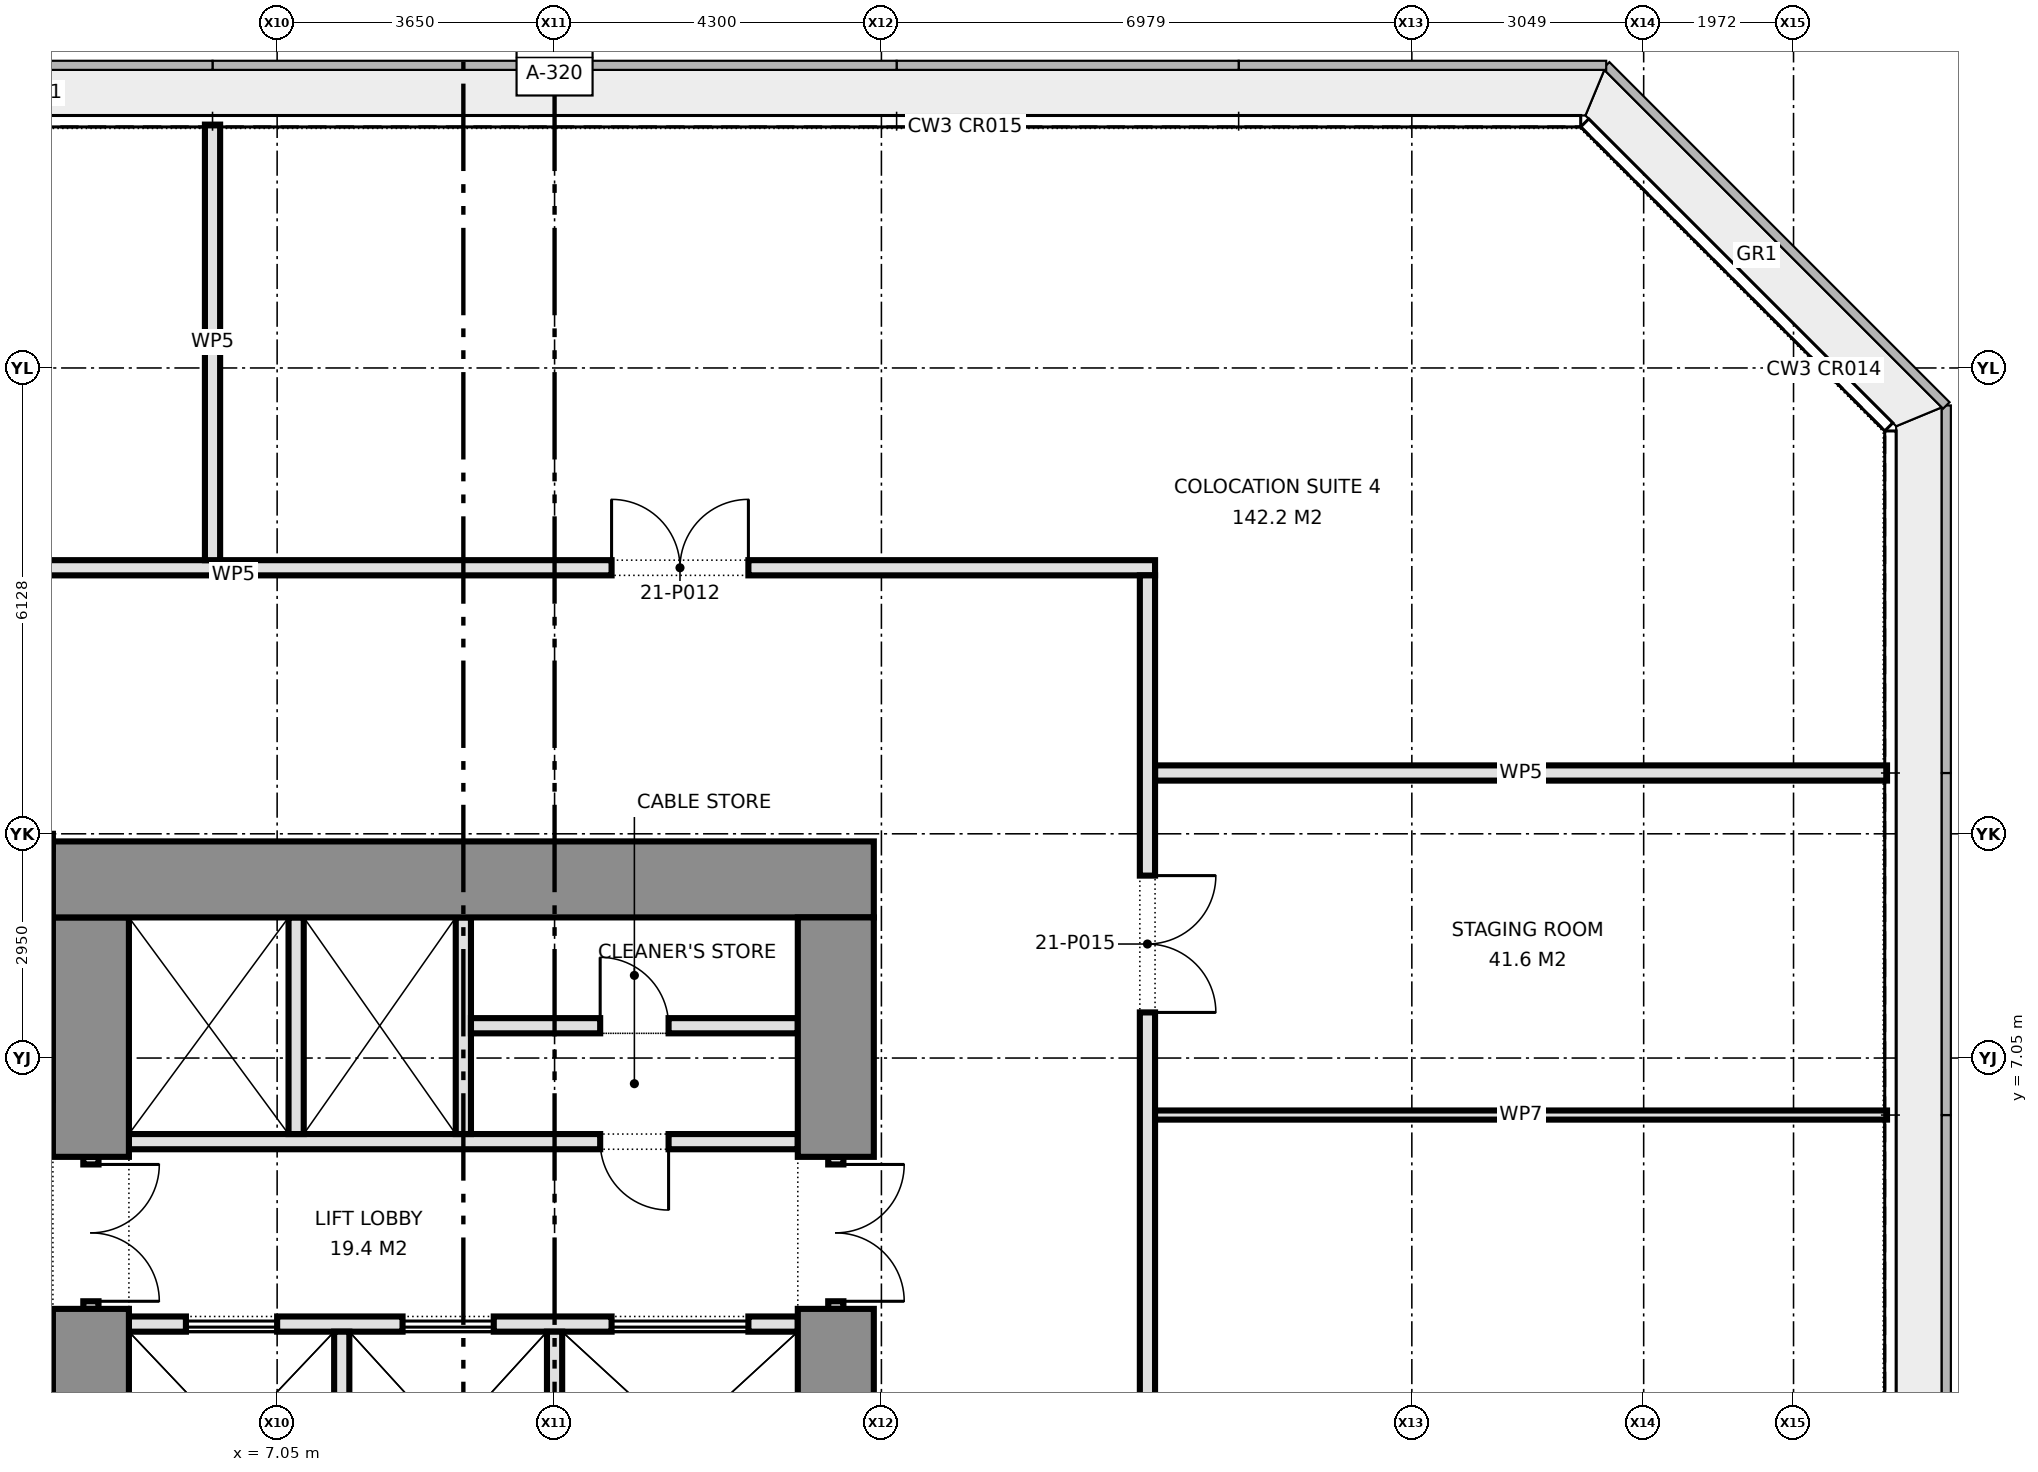
"""IFC4 building model, lengths in metres.
Left out: names, types, materials, properties, quantities, classifications, styles, units other than length and angle.
Written with IfcOpenShell. Run it as: python <this file> out.ifc"""

import sys

from ifc_helpers import new_model, si_unit, direction, frame, frame_2d, origin, place, context, subcontext, project, spatial, rectangle, extrude, element, fill, save


model = new_model("IFC4")
c1 = context("Model", 3, precision=1e-05, world=origin(), true_north=direction((0.0, 1.0)))
c2 = subcontext(c1, "Body", "Model", "MODEL_VIEW")
j1 = project(units=[si_unit("LENGTHUNIT", "METRE"), si_unit("PLANEANGLEUNIT", "RADIAN")], contexts=[c1])
p1 = place(None, origin())
s1 = spatial("IfcSite", under=j1, at=p1, CompositionType="ELEMENT")
p2 = place(p1, origin())
s2 = spatial("IfcBuilding", under=s1, at=p2, CompositionType="ELEMENT")
p3 = place(p2, frame((0.0, 0.0, 95.2)))
s3 = spatial("IfcBuildingStorey", under=s2, at=p3, CompositionType="ELEMENT", Elevation=95.2)
p4 = place(p3, frame((14.9, 9.4, 0.0), z_axis=(0.0, 0.0, 1.0), x_axis=(-1.0, 0.0, 0.0)))
e1 = element("IfcWall", 1, at=p4, inside=s3, PredefinedType="SHEAR", context=c2, shape_type="SweptSolid", body=[
    extrude(rectangle(XDim=10.8, YDim=1.0, at=frame_2d((5.4, 0.0))), origin(), (0.0, 0.0, 1.0), 4.2),
])
p5 = place(p3, frame((14.4, 8.9, 0.0), z_axis=(0.0, 0.0, 1.0), x_axis=(0.0, -1.0, 0.0)))
e2 = element("IfcWall", 2, at=p5, inside=s3, PredefinedType="SHEAR", context=c2, shape_type="SweptSolid", body=[
    extrude(rectangle(XDim=3.15, YDim=1.0, at=frame_2d((1.575, 0.0))), origin(), (0.0, 0.0, 1.0), 4.2),
])
p6 = place(p3, frame((14.4, 5.75, 0.0), z_axis=(0.0, 0.0, 1.0), x_axis=(0.0, -1.0, 0.0)))
e3 = element("IfcWall", 3, at=p6, inside=s3, PredefinedType="PARTITIONING", context=c2, shape_type="SweptSolid", body=[
    extrude(rectangle(XDim=2.0, YDim=0.2, at=frame_2d((1.0, 0.0))), origin(), (0.0, 0.0, 1.0), 2.4),
])
p7 = place(p6, frame((0.1, 0.0, 0.0)))
e4 = element("IfcOpeningElement", 4, at=p7, cuts=e3, PredefinedType="OPENING", context=c2, shape_type="SweptSolid", body=[
    extrude(rectangle(XDim=1.8, YDim=2.1, at=frame_2d((0.9, 1.05))), frame((0.0, 0.11, 0.0), z_axis=(0.0, -1.0, 0.0), x_axis=(1.0, 0.0, 0.0)), (0.0, 0.0, 1.0), 0.22),
])
p8 = place(p3, frame((14.4, 3.75, 0.0), z_axis=(0.0, 0.0, 1.0), x_axis=(0.0, -1.0, 0.0)))
e5 = element("IfcWall", 5, at=p8, inside=s3, PredefinedType="SHEAR", context=c2, shape_type="SweptSolid", body=[
    extrude(rectangle(XDim=6.13, YDim=1.0, at=frame_2d((3.065, 0.0))), origin(), (0.0, 0.0, 1.0), 4.2),
])
p9 = place(p3, frame((4.6, 8.9, 0.0), z_axis=(0.0, 0.0, 1.0), x_axis=(0.0, -1.0, 0.0)))
e6 = element("IfcWall", 6, at=p9, inside=s3, PredefinedType="SHEAR", context=c2, shape_type="SweptSolid", body=[
    extrude(rectangle(XDim=3.15, YDim=1.0, at=frame_2d((1.575, 0.0))), origin(), (0.0, 0.0, 1.0), 4.2),
])
p10 = place(p3, frame((4.6, 5.75, 0.0), z_axis=(0.0, 0.0, 1.0), x_axis=(0.0, -1.0, 0.0)))
e7 = element("IfcWall", 7, at=p10, inside=s3, PredefinedType="PARTITIONING", context=c2, shape_type="SweptSolid", body=[
    extrude(rectangle(XDim=2.0, YDim=0.2, at=frame_2d((1.0, 0.0))), origin(), (0.0, 0.0, 1.0), 2.4),
])
p11 = place(p10, frame((0.1, 0.0, 0.0)))
e8 = element("IfcOpeningElement", 8, at=p11, cuts=e7, PredefinedType="OPENING", context=c2, shape_type="SweptSolid", body=[
    extrude(rectangle(XDim=1.8, YDim=2.1, at=frame_2d((0.9, 1.05))), frame((0.0, 0.11, 0.0), z_axis=(0.0, -1.0, 0.0), x_axis=(1.0, 0.0, 0.0)), (0.0, 0.0, 1.0), 0.22),
])
p12 = place(p3, frame((4.6, 3.75, 0.0), z_axis=(0.0, 0.0, 1.0), x_axis=(0.0, -1.0, 0.0)))
e9 = element("IfcWall", 9, at=p12, inside=s3, PredefinedType="SHEAR", context=c2, shape_type="SweptSolid", body=[
    extrude(rectangle(XDim=4.0, YDim=1.0, at=frame_2d((2.0, 0.0))), origin(), (0.0, 0.0, 1.0), 4.2),
])
p13 = place(p3, frame((13.9, 5.95, 0.0), z_axis=(0.0, 0.0, 1.0), x_axis=(-1.0, 0.0, 0.0)))
e10 = element("IfcWall", 10, at=p13, inside=s3, PredefinedType="PARTITIONING", context=c2, shape_type="SweptSolid", body=[
    extrude(rectangle(XDim=8.8, YDim=0.2, at=frame_2d((4.4, 0.0))), origin(), (0.0, 0.0, 1.0), 4.2),
])
p14 = place(p13, frame((1.7, 0.0, 0.0)))
e11 = element("IfcOpeningElement", 11, at=p14, cuts=e10, PredefinedType="OPENING", context=c2, shape_type="SweptSolid", body=[
    extrude(rectangle(XDim=0.9, YDim=2.1, at=frame_2d((0.45, 1.05))), frame((0.0, 0.11, 0.0), z_axis=(0.0, -1.0, 0.0), x_axis=(1.0, 0.0, 0.0)), (0.0, 0.0, 1.0), 0.22),
])
p15 = place(p3, frame((13.9, 3.55, 0.0), z_axis=(0.0, 0.0, 1.0), x_axis=(-1.0, 0.0, 0.0)))
e12 = element("IfcWall", 12, at=p15, inside=s3, PredefinedType="PARTITIONING", context=c2, shape_type="SweptSolid", body=[
    extrude(rectangle(XDim=8.8, YDim=0.2, at=frame_2d((4.4, 0.0))), origin(), (0.0, 0.0, 1.0), 4.2),
])
p16 = place(p15, frame((0.65, 0.0, 0.0)))
e13 = element("IfcOpeningElement", 13, at=p16, cuts=e12, PredefinedType="OPENING", context=c2, shape_type="SweptSolid", body=[
    extrude(rectangle(XDim=1.8, YDim=2.1, at=frame_2d((0.9, 1.05))), frame((0.0, 0.11, 0.0), z_axis=(0.0, -1.0, 0.0), x_axis=(1.0, 0.0, 0.0)), (0.0, 0.0, 1.0), 0.22),
])
p17 = place(p15, frame((4.0, 0.0, 0.0)))
e14 = element("IfcOpeningElement", 14, at=p17, cuts=e12, PredefinedType="OPENING", context=c2, shape_type="SweptSolid", body=[
    extrude(rectangle(XDim=1.2, YDim=2.1, at=frame_2d((0.6, 1.05))), frame((0.0, 0.11, 0.0), z_axis=(0.0, -1.0, 0.0), x_axis=(1.0, 0.0, 0.0)), (0.0, 0.0, 1.0), 0.22),
])
p18 = place(p15, frame((6.85, 0.0, 0.0)))
e15 = element("IfcOpeningElement", 15, at=p18, cuts=e12, PredefinedType="OPENING", context=c2, shape_type="SweptSolid", body=[
    extrude(rectangle(XDim=1.2, YDim=2.1, at=frame_2d((0.6, 1.05))), frame((0.0, 0.11, 0.0), z_axis=(0.0, -1.0, 0.0), x_axis=(1.0, 0.0, 0.0)), (0.0, 0.0, 1.0), 0.22),
])
for number, where, z_axis, x_axis in (
    (16, (9.5, 8.9, 0.0), (0.0, 0.0, 1.0), (0.0, -1.0, 0.0)),
    (17, (7.3, 8.9, 0.0), (0.0, 0.0, 1.0), (0.0, -1.0, 0.0)),
):
    element("IfcWall", number, at=place(p3, frame(where, z_axis=z_axis, x_axis=x_axis)), inside=s3, PredefinedType="PARTITIONING", context=c2, shape_type="SweptSolid", body=[
        extrude(rectangle(XDim=2.85, YDim=0.2, at=frame_2d((1.425, 0.0))), origin(), (0.0, 0.0, 1.0), 4.2),
    ])
p19 = place(p3, frame((13.9, 7.475, 0.0), z_axis=(0.0, 0.0, 1.0), x_axis=(-1.0, 0.0, 0.0)))
e18 = element("IfcWall", 18, at=p19, inside=s3, PredefinedType="PARTITIONING", context=c2, shape_type="SweptSolid", body=[
    extrude(rectangle(XDim=4.3, YDim=0.2, at=frame_2d((2.15, 0.0))), origin(), (0.0, 0.0, 1.0), 4.2),
])
p20 = place(p19, frame((1.7, 0.0, 0.0)))
e19 = element("IfcOpeningElement", 19, at=p20, cuts=e18, PredefinedType="OPENING", context=c2, shape_type="SweptSolid", body=[
    extrude(rectangle(XDim=0.9, YDim=2.1, at=frame_2d((0.45, 1.05))), frame((0.0, 0.11, 0.0), z_axis=(0.0, -1.0, 0.0), x_axis=(1.0, 0.0, 0.0)), (0.0, 0.0, 1.0), 0.22),
])
for number, where, z_axis, x_axis in (
    (20, (10.7, 3.45, 0.0), (0.0, 0.0, 1.0), (0.0, -1.0, 0.0)),
    (21, (7.9, 3.45, 0.0), (0.0, 0.0, 1.0), (0.0, -1.0, 0.0)),
):
    element("IfcWall", number, at=place(p3, frame(where, z_axis=z_axis, x_axis=x_axis)), inside=s3, PredefinedType="PARTITIONING", context=c2, shape_type="SweptSolid", body=[
        extrude(rectangle(XDim=2.85, YDim=0.2, at=frame_2d((1.425, 0.0))), origin(), (0.0, 0.0, 1.0), 4.2),
    ])
p21 = place(p3, frame((18.6, 10.8, 0.0), z_axis=(0.0, 0.0, 1.0), x_axis=(1.0, 0.0, 0.0)))
e22 = element("IfcWall", 22, at=p21, inside=s3, PredefinedType="PARTITIONING", context=c2, shape_type="SweptSolid", body=[
    extrude(rectangle(XDim=9.63, YDim=0.2, at=frame_2d((4.815, 0.0))), origin(), (0.0, 0.0, 1.0), 4.2),
])
p22 = place(p3, frame((-18.6, 13.5, 0.0), z_axis=(0.0, 0.0, 1.0), x_axis=(1.0, 0.0, 0.0)))
e23 = element("IfcWall", 23, at=p22, inside=s3, PredefinedType="PARTITIONING", context=c2, shape_type="SweptSolid", body=[
    extrude(rectangle(XDim=37.2, YDim=0.2, at=frame_2d((18.6, 0.0))), origin(), (0.0, 0.0, 1.0), 4.2),
])
p23 = place(p22, frame((5.1, 0.0, 0.0)))
e24 = element("IfcOpeningElement", 24, at=p23, cuts=e23, PredefinedType="OPENING", context=c2, shape_type="SweptSolid", body=[
    extrude(rectangle(XDim=1.2, YDim=2.1, at=frame_2d((0.6, 1.05))), frame((0.0, 0.11, 0.0), z_axis=(0.0, -1.0, 0.0), x_axis=(1.0, 0.0, 0.0)), (0.0, 0.0, 1.0), 0.22),
])
p24 = place(p22, frame((18.9, 0.0, 0.0)))
e25 = element("IfcOpeningElement", 25, at=p24, cuts=e23, PredefinedType="OPENING", context=c2, shape_type="SweptSolid", body=[
    extrude(rectangle(XDim=1.2, YDim=2.1, at=frame_2d((0.6, 1.05))), frame((0.0, 0.11, 0.0), z_axis=(0.0, -1.0, 0.0), x_axis=(1.0, 0.0, 0.0)), (0.0, 0.0, 1.0), 0.22),
])
p25 = place(p22, frame((12.15, 0.0, 0.0)))
e26 = element("IfcOpeningElement", 26, at=p25, cuts=e23, PredefinedType="OPENING", context=c2, shape_type="SweptSolid", body=[
    extrude(rectangle(XDim=1.2, YDim=2.1, at=frame_2d((0.6, 1.05))), frame((0.0, 0.11, 0.0), z_axis=(0.0, -1.0, 0.0), x_axis=(1.0, 0.0, 0.0)), (0.0, 0.0, 1.0), 0.22),
])
p26 = place(p22, frame((30.05, 0.0, 0.0)))
e27 = element("IfcOpeningElement", 27, at=p26, cuts=e23, PredefinedType="OPENING", context=c2, shape_type="SweptSolid", body=[
    extrude(rectangle(XDim=1.8, YDim=2.1, at=frame_2d((0.9, 1.05))), frame((0.0, 0.11, 0.0), z_axis=(0.0, -1.0, 0.0), x_axis=(1.0, 0.0, 0.0)), (0.0, 0.0, 1.0), 0.22),
])
p27 = place(p3, frame((18.5, -13.4, 0.0), z_axis=(0.0, 0.0, 1.0), x_axis=(0.0, 1.0, 0.0)))
e28 = element("IfcWall", 28, at=p27, inside=s3, PredefinedType="PARTITIONING", context=c2, shape_type="SweptSolid", body=[
    extrude(rectangle(XDim=26.8, YDim=0.2, at=frame_2d((13.4, 0.0))), origin(), (0.0, 0.0, 1.0), 4.2),
])
p28 = place(p27, frame((5.6, 0.0, 0.0)))
e29 = element("IfcOpeningElement", 29, at=p28, cuts=e28, PredefinedType="OPENING", context=c2, shape_type="SweptSolid", body=[
    extrude(rectangle(XDim=1.2, YDim=2.1, at=frame_2d((0.6, 1.05))), frame((0.0, 0.11, 0.0), z_axis=(0.0, -1.0, 0.0), x_axis=(1.0, 0.0, 0.0)), (0.0, 0.0, 1.0), 0.22),
])
p29 = place(p27, frame((14.6, 0.0, 0.0)))
e30 = element("IfcOpeningElement", 30, at=p29, cuts=e28, PredefinedType="OPENING", context=c2, shape_type="SweptSolid", body=[
    extrude(rectangle(XDim=1.2, YDim=2.1, at=frame_2d((0.6, 1.05))), frame((0.0, 0.11, 0.0), z_axis=(0.0, -1.0, 0.0), x_axis=(1.0, 0.0, 0.0)), (0.0, 0.0, 1.0), 0.22),
])
p30 = place(p27, frame((21.05, 0.0, 0.0)))
e31 = element("IfcOpeningElement", 31, at=p30, cuts=e28, PredefinedType="OPENING", context=c2, shape_type="SweptSolid", body=[
    extrude(rectangle(XDim=1.8, YDim=2.1, at=frame_2d((0.9, 1.05))), frame((0.0, 0.11, 0.0), z_axis=(0.0, -1.0, 0.0), x_axis=(1.0, 0.0, 0.0)), (0.0, 0.0, 1.0), 0.22),
])
p31 = place(p3, frame((6.2, 13.6, 0.0), z_axis=(0.0, 0.0, 1.0), x_axis=(0.0, 1.0, 0.0)))
e32 = element("IfcWall", 32, at=p31, inside=s3, PredefinedType="PARTITIONING", context=c2, shape_type="SweptSolid", body=[
    extrude(rectangle(XDim=5.73, YDim=0.2, at=frame_2d((2.865, 0.0))), origin(), (0.0, 0.0, 1.0), 4.2),
])
p32 = place(p3, frame((18.6, 6.3, 0.0), z_axis=(0.0, 0.0, 1.0), x_axis=(1.0, 0.0, 0.0)))
e33 = element("IfcWall", 33, at=p32, inside=s3, PredefinedType="PARTITIONING", context=c2, shape_type="SweptSolid", body=[
    extrude(rectangle(XDim=9.63, YDim=0.12, at=frame_2d((4.815, 0.0))), origin(), (0.0, 0.0, 1.0), 4.2),
])
p33 = place(p7, origin())
e34 = element("IfcDoor", 34, at=p33, inside=s3, OperationType="DOUBLE_DOOR_SINGLE_SWING", PredefinedType="DOOR", context=c2, shape_type="SweptSolid", body=[
    extrude(rectangle(XDim=1.8, YDim=2.1, at=frame_2d((0.9, 1.05))), frame((0.0, 0.025, 0.0), z_axis=(0.0, -1.0, 0.0), x_axis=(1.0, 0.0, 0.0)), (0.0, 0.0, 1.0), 0.05),
])
fill(e4, e34)
p34 = place(p11, origin())
e35 = element("IfcDoor", 35, at=p34, inside=s3, OperationType="DOUBLE_DOOR_SINGLE_SWING", PredefinedType="DOOR", context=c2, shape_type="SweptSolid", body=[
    extrude(rectangle(XDim=1.8, YDim=2.1, at=frame_2d((0.9, 1.05))), frame((0.0, 0.025, 0.0), z_axis=(0.0, -1.0, 0.0), x_axis=(1.0, 0.0, 0.0)), (0.0, 0.0, 1.0), 0.05),
])
fill(e8, e35)
p35 = place(p16, origin())
e36 = element("IfcDoor", 36, at=p35, inside=s3, OperationType="DOUBLE_DOOR_SLIDING", PredefinedType="DOOR", context=c2, shape_type="SweptSolid", body=[
    extrude(rectangle(XDim=1.8, YDim=2.1, at=frame_2d((0.9, 1.05))), frame((0.0, 0.025, 0.0), z_axis=(0.0, -1.0, 0.0), x_axis=(1.0, 0.0, 0.0)), (0.0, 0.0, 1.0), 0.05),
])
fill(e13, e36)
p36 = place(p17, origin())
e37 = element("IfcDoor", 37, at=p36, inside=s3, OperationType="DOUBLE_DOOR_SLIDING", PredefinedType="DOOR", context=c2, shape_type="SweptSolid", body=[
    extrude(rectangle(XDim=1.2, YDim=2.1, at=frame_2d((0.6, 1.05))), frame((0.0, 0.025, 0.0), z_axis=(0.0, -1.0, 0.0), x_axis=(1.0, 0.0, 0.0)), (0.0, 0.0, 1.0), 0.05),
])
fill(e14, e37)
p37 = place(p18, origin())
e38 = element("IfcDoor", 38, at=p37, inside=s3, OperationType="DOUBLE_DOOR_SLIDING", PredefinedType="DOOR", context=c2, shape_type="SweptSolid", body=[
    extrude(rectangle(XDim=1.2, YDim=2.1, at=frame_2d((0.6, 1.05))), frame((0.0, 0.025, 0.0), z_axis=(0.0, -1.0, 0.0), x_axis=(1.0, 0.0, 0.0)), (0.0, 0.0, 1.0), 0.05),
])
fill(e15, e38)
p38 = place(p14, origin())
e39 = element("IfcDoor", 39, at=p38, inside=s3, OperationType="SINGLE_SWING_LEFT", PredefinedType="DOOR", context=c2, shape_type="SweptSolid", body=[
    extrude(rectangle(XDim=0.9, YDim=2.1, at=frame_2d((0.45, 1.05))), frame((0.0, 0.025, 0.0), z_axis=(0.0, -1.0, 0.0), x_axis=(1.0, 0.0, 0.0)), (0.0, 0.0, 1.0), 0.05),
])
fill(e11, e39)
p39 = place(p20, frame((0.9, 0.0, 0.0), z_axis=(0.0, 0.0, 1.0), x_axis=(-1.0, 0.0, 0.0)))
e40 = element("IfcDoor", 40, at=p39, inside=s3, OperationType="SINGLE_SWING_LEFT", PredefinedType="DOOR", context=c2, shape_type="SweptSolid", body=[
    extrude(rectangle(XDim=0.9, YDim=2.1, at=frame_2d((0.45, 1.05))), frame((0.0, 0.025, 0.0), z_axis=(0.0, -1.0, 0.0), x_axis=(1.0, 0.0, 0.0)), (0.0, 0.0, 1.0), 0.05),
])
fill(e19, e40)
p40 = place(p26, origin())
e41 = element("IfcDoor", 41, at=p40, inside=s3, OperationType="DOUBLE_DOOR_SINGLE_SWING", PredefinedType="DOOR", context=c2, shape_type="SweptSolid", body=[
    extrude(rectangle(XDim=1.8, YDim=2.1, at=frame_2d((0.9, 1.05))), frame((0.0, 0.025, 0.0), z_axis=(0.0, -1.0, 0.0), x_axis=(1.0, 0.0, 0.0)), (0.0, 0.0, 1.0), 0.05),
])
fill(e27, e41)
p41 = place(p30, frame((1.8, 0.0, 0.0), z_axis=(0.0, 0.0, 1.0), x_axis=(-1.0, 0.0, 0.0)))
e42 = element("IfcDoor", 42, at=p41, inside=s3, OperationType="DOUBLE_DOOR_SINGLE_SWING", PredefinedType="DOOR", context=c2, shape_type="SweptSolid", body=[
    extrude(rectangle(XDim=1.8, YDim=2.1, at=frame_2d((0.9, 1.05))), frame((0.0, 0.025, 0.0), z_axis=(0.0, -1.0, 0.0), x_axis=(1.0, 0.0, 0.0)), (0.0, 0.0, 1.0), 0.05),
])
fill(e31, e42)
save(model, sys.argv[1])
